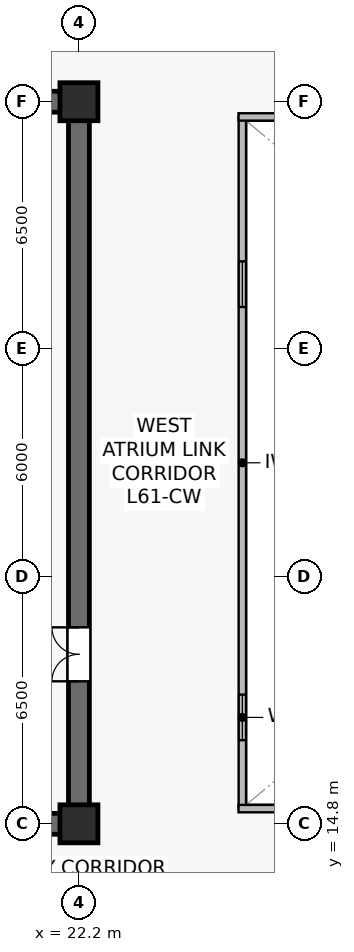
"""IFC4 building model, lengths in metres.
Left out: names, types, materials, properties, quantities, classifications, styles, units other than length and angle.
Written with IfcOpenShell. Run it as: python <this file> out.ifc"""

import sys

from ifc_helpers import new_model, si_unit, direction, frame, frame_2d, origin, origin_2d, place, context, subcontext, project, spatial, rectangle, extrude, source, transform, mapped, element, fill, save


model = new_model("IFC4")
c1 = context("Model", 3, precision=1e-05, world=origin(), true_north=direction((0.0, 1.0)))
c2 = subcontext(c1, "Body", "Model", "MODEL_VIEW")
j1 = project(units=[si_unit("LENGTHUNIT", "METRE"), si_unit("PLANEANGLEUNIT", "RADIAN")], contexts=[c1])
p1 = place(None, origin())
s1 = spatial("IfcSite", under=j1, at=p1, CompositionType="ELEMENT")
p2 = place(p1, origin())
s2 = spatial("IfcBuilding", under=s1, at=p2, CompositionType="ELEMENT")
p3 = place(p2, frame((0.0, 0.0, 254.7)))
s3 = spatial("IfcBuildingStorey", under=s2, at=p3, CompositionType="ELEMENT", Elevation=254.7)
p4 = place(p3, frame((7.125, 14.8, 0.0), z_axis=(0.0, 0.0, 1.0), x_axis=(1.0, 0.0, 0.0)))
e1 = element("IfcWall", 1, at=p4, inside=s3, PredefinedType="SHEAR", context=c2, shape_type="SweptSolid", body=[
    extrude(rectangle(XDim=15.35, YDim=0.55, at=frame_2d((7.675, 0.0))), origin(), (0.0, 0.0, 1.0), 3.8),
])
p5 = place(p3, frame((7.125, 33.8, 0.0), z_axis=(0.0, 0.0, 1.0), x_axis=(1.0, 0.0, 0.0)))
e2 = element("IfcWall", 2, at=p5, inside=s3, PredefinedType="SHEAR", context=c2, shape_type="SweptSolid", body=[
    extrude(rectangle(XDim=15.35, YDim=0.55, at=frame_2d((7.675, 0.0))), origin(), (0.0, 0.0, 1.0), 3.8),
])
p6 = place(p5, frame((5.625, 0.0, 0.0)))
e3 = element("IfcOpeningElement", 3, at=p6, cuts=e2, PredefinedType="OPENING", context=c2, shape_type="SweptSolid", body=[
    extrude(rectangle(XDim=0.95, YDim=2.15, at=frame_2d((0.475, 1.075))), frame((0.0, 0.285, 0.0), z_axis=(0.0, -1.0, 0.0), x_axis=(1.0, 0.0, 0.0)), (0.0, 0.0, 1.0), 0.57),
])
p7 = place(p5, frame((8.99, 0.0, 0.0)))
e4 = element("IfcOpeningElement", 4, at=p7, cuts=e2, PredefinedType="OPENING", context=c2, shape_type="SweptSolid", body=[
    extrude(rectangle(XDim=0.95, YDim=2.15, at=frame_2d((0.475, 1.075))), frame((0.0, 0.285, 0.0), z_axis=(0.0, -1.0, 0.0), x_axis=(1.0, 0.0, 0.0)), (0.0, 0.0, 1.0), 0.57),
])
p8 = place(p5, frame((12.39, 0.0, 0.0)))
e5 = element("IfcOpeningElement", 5, at=p8, cuts=e2, PredefinedType="OPENING", context=c2, shape_type="SweptSolid", body=[
    extrude(rectangle(XDim=0.95, YDim=2.15, at=frame_2d((0.475, 1.075))), frame((0.0, 0.285, 0.0), z_axis=(0.0, -1.0, 0.0), x_axis=(1.0, 0.0, 0.0)), (0.0, 0.0, 1.0), 0.57),
])
p9 = place(p3, frame((22.2, 15.075, 0.0), z_axis=(0.0, 0.0, 1.0), x_axis=(0.0, 1.0, 0.0)))
e6 = element("IfcWall", 6, at=p9, inside=s3, PredefinedType="SHEAR", context=c2, shape_type="SweptSolid", body=[
    extrude(rectangle(XDim=18.45, YDim=0.55, at=frame_2d((9.225, 0.0))), origin(), (0.0, 0.0, 1.0), 3.8),
])
p10 = place(p9, frame((3.475, 0.0, 0.0)))
e7 = element("IfcOpeningElement", 7, at=p10, cuts=e6, PredefinedType="OPENING", context=c2, shape_type="SweptSolid", body=[
    extrude(rectangle(XDim=1.42, YDim=2.2, at=frame_2d((0.71, 1.1))), frame((0.0, 0.285, 0.0), z_axis=(0.0, -1.0, 0.0), x_axis=(1.0, 0.0, 0.0)), (0.0, 0.0, 1.0), 0.57),
])
m1 = source(origin(), c2, "Body", "SweptSolid", [
    extrude(rectangle(XDim=1.0, YDim=1.0, at=origin_2d()), origin(), (0.0, 0.0, 1.0), 4.1),
])
for number, where, z_axis, x_axis in (
    (8, (22.2, 14.8, 0.0), (0.0, 0.0, 1.0), (1.0, 0.0, 0.0)),
    (9, (22.2, 33.8, 0.0), (0.0, 0.0, 1.0), (1.0, 0.0, 0.0)),
):
    element("IfcColumn", number, at=place(p3, frame(where, z_axis=z_axis, x_axis=x_axis)), inside=s3, PredefinedType="COLUMN", context=c2, shape_type="MappedRepresentation", body=[
        mapped(m1, transform((0.0, 0.0, 0.0), scale=1.0)),
    ])
p11 = place(p3, frame((26.5, 15.2, 0.0), z_axis=(0.0, 0.0, 1.0), x_axis=(0.0, 1.0, 0.0)))
e10 = element("IfcWall", 10, at=p11, inside=s3, PredefinedType="SOLIDWALL", context=c2, shape_type="SweptSolid", body=[
    extrude(rectangle(XDim=18.2, YDim=0.195, at=frame_2d((9.1, 0.0))), origin(), (0.0, 0.0, 1.0), 3.8),
])
p12 = place(p11, frame((1.8, 0.0, 0.9)))
e11 = element("IfcOpeningElement", 11, at=p12, cuts=e10, PredefinedType="OPENING", context=c2, shape_type="SweptSolid", body=[
    extrude(rectangle(XDim=1.2, YDim=1.35, at=frame_2d((0.6, 0.675))), frame((0.0, 0.107, 0.0), z_axis=(0.0, -1.0, 0.0), x_axis=(1.0, 0.0, 0.0)), (0.0, 0.0, 1.0), 0.215),
])
p13 = place(p11, frame((13.2, 0.0, 0.9)))
e12 = element("IfcOpeningElement", 12, at=p13, cuts=e10, PredefinedType="OPENING", context=c2, shape_type="SweptSolid", body=[
    extrude(rectangle(XDim=1.2, YDim=1.35, at=frame_2d((0.6, 0.675))), frame((0.0, 0.107, 0.0), z_axis=(0.0, -1.0, 0.0), x_axis=(1.0, 0.0, 0.0)), (0.0, 0.0, 1.0), 0.215),
])
for number, where, z_axis, x_axis in (
    (13, (26.4, 15.2, 0.0), (0.0, 0.0, 1.0), (1.0, 0.0, 0.0)),
    (14, (26.4, 33.4, 0.0), (0.0, 0.0, 1.0), (1.0, 0.0, 0.0)),
):
    element("IfcWall", number, at=place(p3, frame(where, z_axis=z_axis, x_axis=x_axis)), inside=s3, PredefinedType="SOLIDWALL", context=c2, shape_type="SweptSolid", body=[
        extrude(rectangle(XDim=22.0, YDim=0.195, at=frame_2d((11.0, 0.0))), origin(), (0.0, 0.0, 1.0), 3.8),
    ])
m2 = source(origin(), c2, "Body", "SweptSolid", [
    extrude(rectangle(XDim=1.2, YDim=1.35, at=frame_2d((0.6, 0.675))), frame((0.0, 0.03, 0.0), z_axis=(0.0, -1.0, 0.0), x_axis=(1.0, 0.0, 0.0)), (0.0, 0.0, 1.0), 0.06),
])
p14 = place(p12, origin())
e15 = element("IfcWindow", 15, at=p14, inside=s3, PartitioningType="SINGLE_PANEL", PredefinedType="WINDOW", context=c2, shape_type="MappedRepresentation", body=[
    mapped(m2, transform((0.0, 0.0, 0.0), scale=1.0)),
])
fill(e11, e15)
p15 = place(p13, origin())
e16 = element("IfcWindow", 16, at=p15, inside=s3, PartitioningType="SINGLE_PANEL", PredefinedType="WINDOW", context=c2, shape_type="MappedRepresentation", body=[
    mapped(m2, transform((0.0, 0.0, 0.0), scale=1.0)),
])
fill(e12, e16)
m3 = source(origin(), c2, "Body", "SweptSolid", [
    extrude(rectangle(XDim=1.42, YDim=2.2, at=frame_2d((0.71, 1.1))), frame((0.0, 0.025, 0.0), z_axis=(0.0, -1.0, 0.0), x_axis=(1.0, 0.0, 0.0)), (0.0, 0.0, 1.0), 0.05),
])
p16 = place(p10, origin())
e17 = element("IfcDoor", 17, at=p16, inside=s3, OperationType="DOUBLE_DOOR_SINGLE_SWING", PredefinedType="DOOR", context=c2, shape_type="MappedRepresentation", body=[
    mapped(m3, transform((0.0, 0.0, 0.0), scale=1.0)),
])
fill(e7, e17)
save(model, sys.argv[1])
